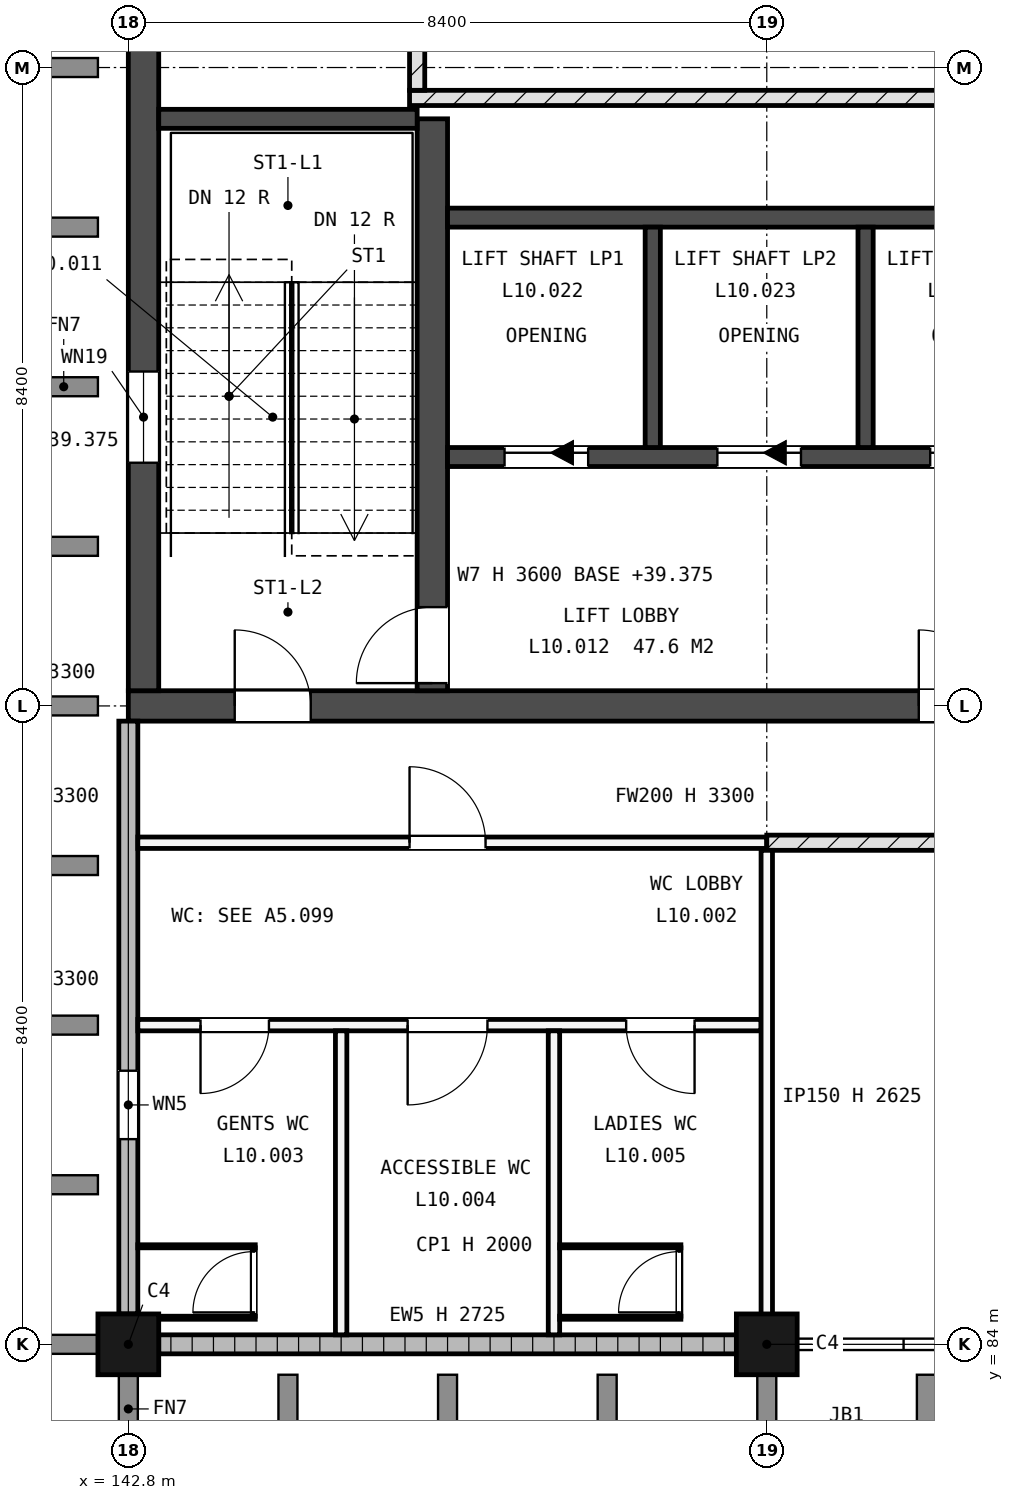
"""IFC4 building model, lengths in metres.
Left out: names, types, materials, properties, quantities, classifications, styles, units other than length and angle.
Written with IfcOpenShell. Run it as: python <this file> out.ifc"""

import sys

from ifc_helpers import new_model, si_unit, direction, frame, frame_2d, origin, origin_2d, place, context, subcontext, project, spatial, rectangle, extrude, element, fill, save


model = new_model("IFC4")
c1 = context("Model", 3, precision=1e-05, world=origin(), true_north=direction((0.0, 1.0)))
c2 = subcontext(c1, "Body", "Model", "MODEL_VIEW")
j1 = project(units=[si_unit("LENGTHUNIT", "METRE"), si_unit("PLANEANGLEUNIT", "RADIAN")], contexts=[c1])
p1 = place(None, origin())
s1 = spatial("IfcSite", under=j1, at=p1, CompositionType="ELEMENT")
p2 = place(p1, origin())
s2 = spatial("IfcBuilding", under=s1, at=p2, CompositionType="ELEMENT")
p3 = place(p2, frame((0.0, 0.0, 39.6)))
s3 = spatial("IfcBuildingStorey", under=s2, at=p3, CompositionType="ELEMENT", Elevation=39.6)
for number, where, z_axis, x_axis in (
    (1, (142.8, 84.0, -0.225), (0.0, 0.0, 1.0), (1.0, 0.0, 0.0)),
    (2, (151.2, 84.0, -0.225), (0.0, 0.0, 1.0), (1.0, 0.0, 0.0)),
):
    element("IfcColumn", number, at=place(p3, frame(where, z_axis=z_axis, x_axis=x_axis)), inside=s3, PredefinedType="COLUMN", context=c2, shape_type="SweptSolid", body=[
        extrude(rectangle(XDim=0.8, YDim=0.8, at=origin_2d()), origin(), (0.0, 0.0, 1.0), 3.6),
    ])
p4 = place(p3, frame((142.8, 92.4, -0.225), z_axis=(0.0, 0.0, 1.0), x_axis=(1.0, 0.0, 0.0)))
e3 = element("IfcWall", 3, at=p4, inside=s3, PredefinedType="SHEAR", context=c2, shape_type="SweptSolid", body=[
    extrude(rectangle(XDim=25.2, YDim=0.4, at=frame_2d((12.6, 0.0))), origin(), (0.0, 0.0, 1.0), 3.6),
])
p5 = place(p4, frame((1.4, 0.0, 0.225)))
e4 = element("IfcOpeningElement", 4, at=p5, cuts=e3, PredefinedType="OPENING", context=c2, shape_type="SweptSolid", body=[
    extrude(rectangle(XDim=1.0, YDim=2.1, at=frame_2d((0.5, 1.05))), frame((0.0, 0.21, 0.0), z_axis=(0.0, -1.0, 0.0), x_axis=(1.0, 0.0, 0.0)), (0.0, 0.0, 1.0), 0.42),
])
p6 = place(p4, frame((19.1, 0.0, 0.225)))
e5 = element("IfcOpeningElement", 5, at=p6, cuts=e3, PredefinedType="OPENING", context=c2, shape_type="SweptSolid", body=[
    extrude(rectangle(XDim=1.0, YDim=2.1, at=frame_2d((0.5, 1.05))), frame((0.0, 0.21, 0.0), z_axis=(0.0, -1.0, 0.0), x_axis=(1.0, 0.0, 0.0)), (0.0, 0.0, 1.0), 0.42),
])
p7 = place(p4, frame((10.4, 0.0, 0.225)))
e6 = element("IfcOpeningElement", 6, at=p7, cuts=e3, PredefinedType="OPENING", context=c2, shape_type="SweptSolid", body=[
    extrude(rectangle(XDim=1.0, YDim=2.1, at=frame_2d((0.5, 1.05))), frame((0.0, 0.21, 0.0), z_axis=(0.0, -1.0, 0.0), x_axis=(1.0, 0.0, 0.0)), (0.0, 0.0, 1.0), 0.42),
])
p8 = place(p3, frame((143.0, 92.6, -0.225), z_axis=(0.0, 0.0, 1.0), x_axis=(0.0, 1.0, 0.0)))
e7 = element("IfcWall", 7, at=p8, inside=s3, PredefinedType="SHEAR", context=c2, shape_type="SweptSolid", body=[
    extrude(rectangle(XDim=16.4, YDim=0.4, at=frame_2d((8.2, 0.0))), origin(), (0.0, 0.0, 1.0), 3.6),
])
p9 = place(p8, frame((3.0, 0.0, 1.825)))
e8 = element("IfcOpeningElement", 8, at=p9, cuts=e7, PredefinedType="OPENING", context=c2, shape_type="SweptSolid", body=[
    extrude(rectangle(XDim=1.2, YDim=0.9, at=frame_2d((0.6, 0.45))), frame((0.0, 0.21, 0.0), z_axis=(0.0, -1.0, 0.0), x_axis=(1.0, 0.0, 0.0)), (0.0, 0.0, 1.0), 0.42),
])
p10 = place(p3, frame((146.8, 92.6, -0.225), z_axis=(0.0, 0.0, 1.0), x_axis=(0.0, 1.0, 0.0)))
e9 = element("IfcWall", 9, at=p10, inside=s3, PredefinedType="SHEAR", context=c2, shape_type="SweptSolid", body=[
    extrude(rectangle(XDim=7.525, YDim=0.4, at=frame_2d((3.762, 0.0))), origin(), (0.0, 0.0, 1.0), 3.6),
])
p11 = place(p10, frame((0.1, 0.0, 0.225)))
e10 = element("IfcOpeningElement", 10, at=p11, cuts=e9, PredefinedType="OPENING", context=c2, shape_type="SweptSolid", body=[
    extrude(rectangle(XDim=1.0, YDim=2.1, at=frame_2d((0.5, 1.05))), frame((0.0, 0.21, 0.0), z_axis=(0.0, -1.0, 0.0), x_axis=(1.0, 0.0, 0.0)), (0.0, 0.0, 1.0), 0.42),
])
p12 = place(p3, frame((143.2, 100.125, -0.225), z_axis=(0.0, 0.0, 1.0), x_axis=(1.0, 0.0, 0.0)))
e11 = element("IfcWall", 11, at=p12, inside=s3, PredefinedType="SHEAR", context=c2, shape_type="SweptSolid", body=[
    extrude(rectangle(XDim=3.4, YDim=0.25, at=frame_2d((1.7, 0.0))), origin(), (0.0, 0.0, 1.0), 3.6),
])
p13 = place(p3, frame((147.0, 95.675, -0.225), z_axis=(0.0, 0.0, 1.0), x_axis=(1.0, 0.0, 0.0)))
e12 = element("IfcWall", 12, at=p13, inside=s3, PredefinedType="SHEAR", context=c2, shape_type="SweptSolid", body=[
    extrude(rectangle(XDim=11.25, YDim=0.25, at=frame_2d((5.625, 0.0))), origin(), (0.0, 0.0, 1.0), 3.6),
])
p14 = place(p13, frame((0.75, 0.0, 0.225)))
e13 = element("IfcOpeningElement", 13, at=p14, cuts=e12, PredefinedType="OPENING", context=c2, shape_type="SweptSolid", body=[
    extrude(rectangle(XDim=1.1, YDim=2.1, at=frame_2d((0.55, 1.05))), frame((0.0, 0.135, 0.0), z_axis=(0.0, -1.0, 0.0), x_axis=(1.0, 0.0, 0.0)), (0.0, 0.0, 1.0), 0.27),
])
p15 = place(p13, frame((3.55, 0.0, 0.225)))
e14 = element("IfcOpeningElement", 14, at=p15, cuts=e12, PredefinedType="OPENING", context=c2, shape_type="SweptSolid", body=[
    extrude(rectangle(XDim=1.1, YDim=2.1, at=frame_2d((0.55, 1.05))), frame((0.0, 0.135, 0.0), z_axis=(0.0, -1.0, 0.0), x_axis=(1.0, 0.0, 0.0)), (0.0, 0.0, 1.0), 0.27),
])
p16 = place(p13, frame((6.35, 0.0, 0.225)))
e15 = element("IfcOpeningElement", 15, at=p16, cuts=e12, PredefinedType="OPENING", context=c2, shape_type="SweptSolid", body=[
    extrude(rectangle(XDim=1.1, YDim=2.1, at=frame_2d((0.55, 1.05))), frame((0.0, 0.135, 0.0), z_axis=(0.0, -1.0, 0.0), x_axis=(1.0, 0.0, 0.0)), (0.0, 0.0, 1.0), 0.27),
])
p17 = place(p13, frame((9.15, 0.0, 0.225)))
e16 = element("IfcOpeningElement", 16, at=p17, cuts=e12, PredefinedType="OPENING", context=c2, shape_type="SweptSolid", body=[
    extrude(rectangle(XDim=1.1, YDim=2.1, at=frame_2d((0.55, 1.05))), frame((0.0, 0.135, 0.0), z_axis=(0.0, -1.0, 0.0), x_axis=(1.0, 0.0, 0.0)), (0.0, 0.0, 1.0), 0.27),
])
p18 = place(p3, frame((147.0, 98.825, -0.225), z_axis=(0.0, 0.0, 1.0), x_axis=(1.0, 0.0, 0.0)))
e17 = element("IfcWall", 17, at=p18, inside=s3, PredefinedType="SHEAR", context=c2, shape_type="SweptSolid", body=[
    extrude(rectangle(XDim=11.25, YDim=0.25, at=frame_2d((5.625, 0.0))), origin(), (0.0, 0.0, 1.0), 3.6),
])
for number, where, z_axis, x_axis in (
    (18, (149.7, 95.8, -0.225), (0.0, 0.0, 1.0), (0.0, 1.0, 0.0)),
    (19, (152.5, 95.8, -0.225), (0.0, 0.0, 1.0), (0.0, 1.0, 0.0)),
):
    element("IfcWall", number, at=place(p3, frame(where, z_axis=z_axis, x_axis=x_axis)), inside=s3, PredefinedType="SHEAR", context=c2, shape_type="SweptSolid", body=[
        extrude(rectangle(XDim=2.9, YDim=0.2, at=frame_2d((1.45, 0.0))), origin(), (0.0, 0.0, 1.0), 3.6),
    ])
p19 = place(p3, frame((143.2, 84.0, 0.0), z_axis=(0.0, 0.0, 1.0), x_axis=(1.0, 0.0, 0.0)))
e20 = element("IfcWall", 20, at=p19, inside=s3, PredefinedType="STANDARD", context=c2, shape_type="SweptSolid", body=[
    extrude(rectangle(XDim=7.6, YDim=0.25, at=frame_2d((3.8, 0.0))), origin(), (0.0, 0.0, 1.0), 2.725),
])
p20 = place(p3, frame((142.8, 84.4, 0.0), z_axis=(0.0, 0.0, 1.0), x_axis=(0.0, 1.0, 0.0)))
e21 = element("IfcWall", 21, at=p20, inside=s3, PredefinedType="STANDARD", context=c2, shape_type="SweptSolid", body=[
    extrude(rectangle(XDim=7.8, YDim=0.25, at=frame_2d((3.9, 0.0))), origin(), (0.0, 0.0, 1.0), 3.3),
])
p21 = place(p20, frame((2.3, 0.0, 2.1)))
e22 = element("IfcOpeningElement", 22, at=p21, cuts=e21, PredefinedType="OPENING", context=c2, shape_type="SweptSolid", body=[
    extrude(rectangle(XDim=0.9, YDim=0.6, at=frame_2d((0.45, 0.3))), frame((0.0, 0.135, 0.0), z_axis=(0.0, -1.0, 0.0), x_axis=(1.0, 0.0, 0.0)), (0.0, 0.0, 1.0), 0.27),
])
p22 = place(p3, frame((142.925, 88.2, 0.0), z_axis=(0.0, 0.0, 1.0), x_axis=(1.0, 0.0, 0.0)))
e23 = element("IfcWall", 23, at=p22, inside=s3, PredefinedType="PARTITIONING", context=c2, shape_type="SweptSolid", body=[
    extrude(rectangle(XDim=8.2, YDim=0.15, at=frame_2d((4.1, 0.0))), origin(), (0.0, 0.0, 1.0), 3.3),
])
p23 = place(p22, frame((0.825, 0.0, 0.0)))
e24 = element("IfcOpeningElement", 24, at=p23, cuts=e23, PredefinedType="OPENING", context=c2, shape_type="SweptSolid", body=[
    extrude(rectangle(XDim=0.9, YDim=2.1, at=frame_2d((0.45, 1.05))), frame((0.0, 0.085, 0.0), z_axis=(0.0, -1.0, 0.0), x_axis=(1.0, 0.0, 0.0)), (0.0, 0.0, 1.0), 0.17),
])
p24 = place(p22, frame((3.55, 0.0, 0.0)))
e25 = element("IfcOpeningElement", 25, at=p24, cuts=e23, PredefinedType="OPENING", context=c2, shape_type="SweptSolid", body=[
    extrude(rectangle(XDim=1.05, YDim=2.25, at=frame_2d((0.525, 1.125))), frame((0.0, 0.085, 0.0), z_axis=(0.0, -1.0, 0.0), x_axis=(1.0, 0.0, 0.0)), (0.0, 0.0, 1.0), 0.17),
])
p25 = place(p22, frame((6.425, 0.0, 0.0)))
e26 = element("IfcOpeningElement", 26, at=p25, cuts=e23, PredefinedType="OPENING", context=c2, shape_type="SweptSolid", body=[
    extrude(rectangle(XDim=0.9, YDim=2.1, at=frame_2d((0.45, 1.05))), frame((0.0, 0.085, 0.0), z_axis=(0.0, -1.0, 0.0), x_axis=(1.0, 0.0, 0.0)), (0.0, 0.0, 1.0), 0.17),
])
p26 = place(p3, frame((142.925, 90.6, 0.0), z_axis=(0.0, 0.0, 1.0), x_axis=(1.0, 0.0, 0.0)))
e27 = element("IfcWall", 27, at=p26, inside=s3, PredefinedType="PARTITIONING", context=c2, shape_type="SweptSolid", body=[
    extrude(rectangle(XDim=8.275, YDim=0.15, at=frame_2d((4.137, 0.0))), origin(), (0.0, 0.0, 1.0), 3.3),
])
p27 = place(p26, frame((3.575, 0.0, 0.0)))
e28 = element("IfcOpeningElement", 28, at=p27, cuts=e27, PredefinedType="OPENING", context=c2, shape_type="SweptSolid", body=[
    extrude(rectangle(XDim=1.0, YDim=2.1, at=frame_2d((0.5, 1.05))), frame((0.0, 0.085, 0.0), z_axis=(0.0, -1.0, 0.0), x_axis=(1.0, 0.0, 0.0)), (0.0, 0.0, 1.0), 0.17),
])
p28 = place(p3, frame((151.2, 90.6, 0.0), z_axis=(0.0, 0.0, 1.0), x_axis=(1.0, 0.0, 0.0)))
e29 = element("IfcWall", 29, at=p28, inside=s3, PredefinedType="SOLIDWALL", context=c2, shape_type="SweptSolid", body=[
    extrude(rectangle(XDim=16.8, YDim=0.2, at=frame_2d((8.4, 0.0))), origin(), (0.0, 0.0, 1.0), 3.3),
])
p29 = place(p28, frame((5.8, 0.0, 0.0)))
e30 = element("IfcOpeningElement", 30, at=p29, cuts=e29, PredefinedType="OPENING", context=c2, shape_type="SweptSolid", body=[
    extrude(rectangle(XDim=1.0, YDim=2.1, at=frame_2d((0.5, 1.05))), frame((0.0, 0.11, 0.0), z_axis=(0.0, -1.0, 0.0), x_axis=(1.0, 0.0, 0.0)), (0.0, 0.0, 1.0), 0.22),
])
p30 = place(p28, frame((14.2, 0.0, 0.0)))
e31 = element("IfcOpeningElement", 31, at=p30, cuts=e29, PredefinedType="OPENING", context=c2, shape_type="SweptSolid", body=[
    extrude(rectangle(XDim=1.0, YDim=2.1, at=frame_2d((0.5, 1.05))), frame((0.0, 0.11, 0.0), z_axis=(0.0, -1.0, 0.0), x_axis=(1.0, 0.0, 0.0)), (0.0, 0.0, 1.0), 0.22),
])
p31 = place(p3, frame((146.5, 100.4, 0.0), z_axis=(0.0, 0.0, 1.0), x_axis=(1.0, 0.0, 0.0)))
e32 = element("IfcWall", 32, at=p31, inside=s3, PredefinedType="SOLIDWALL", context=c2, shape_type="SweptSolid", body=[
    extrude(rectangle(XDim=14.0, YDim=0.2, at=frame_2d((7.0, 0.0))), origin(), (0.0, 0.0, 1.0), 3.3),
])
p32 = place(p3, frame((145.6, 84.125, 0.0), z_axis=(0.0, 0.0, 1.0), x_axis=(0.0, 1.0, 0.0)))
e33 = element("IfcWall", 33, at=p32, inside=s3, PredefinedType="PARTITIONING", context=c2, shape_type="SweptSolid", body=[
    extrude(rectangle(XDim=4.0, YDim=0.15, at=frame_2d((2.0, 0.0))), origin(), (0.0, 0.0, 1.0), 3.3),
])
p33 = place(p3, frame((146.6, 100.5, 0.0), z_axis=(0.0, 0.0, 1.0), x_axis=(0.0, 1.0, 0.0)))
e34 = element("IfcWall", 34, at=p33, inside=s3, PredefinedType="SOLIDWALL", context=c2, shape_type="SweptSolid", body=[
    extrude(rectangle(XDim=5.3, YDim=0.2, at=frame_2d((2.65, 0.0))), origin(), (0.0, 0.0, 1.0), 3.3),
])
p34 = place(p33, frame((1.8, 0.0, 0.0)))
e35 = element("IfcOpeningElement", 35, at=p34, cuts=e34, PredefinedType="OPENING", context=c2, shape_type="SweptSolid", body=[
    extrude(rectangle(XDim=1.0, YDim=2.1, at=frame_2d((0.5, 1.05))), frame((0.0, 0.11, 0.0), z_axis=(0.0, -1.0, 0.0), x_axis=(1.0, 0.0, 0.0)), (0.0, 0.0, 1.0), 0.22),
])
p35 = place(p3, frame((148.4, 84.125, 0.0), z_axis=(0.0, 0.0, 1.0), x_axis=(0.0, 1.0, 0.0)))
e36 = element("IfcWall", 36, at=p35, inside=s3, PredefinedType="PARTITIONING", context=c2, shape_type="SweptSolid", body=[
    extrude(rectangle(XDim=4.0, YDim=0.15, at=frame_2d((2.0, 0.0))), origin(), (0.0, 0.0, 1.0), 3.3),
])
p36 = place(p3, frame((151.2, 84.0, 0.0), z_axis=(0.0, 0.0, 1.0), x_axis=(0.0, 1.0, 0.0)))
e37 = element("IfcWall", 37, at=p36, inside=s3, PredefinedType="PARTITIONING", context=c2, shape_type="SweptSolid", body=[
    extrude(rectangle(XDim=6.5, YDim=0.15, at=frame_2d((3.25, 0.0))), origin(), (0.0, 0.0, 1.0), 2.625),
])
p37 = place(p3, frame((142.93, 84.35, 0.0), z_axis=(0.0, 0.0, 1.0), x_axis=(1.0, 0.0, 0.0)))
e38 = element("IfcWall", 38, at=p37, inside=s3, PredefinedType="PARTITIONING", context=c2, shape_type="SweptSolid", body=[
    extrude(rectangle(XDim=1.54, YDim=0.04, at=frame_2d((0.77, 0.0))), origin(), (0.0, 0.0, 1.0), 2.0),
])
p38 = place(p3, frame((142.925, 85.29, 0.0), z_axis=(0.0, 0.0, 1.0), x_axis=(1.0, 0.0, 0.0)))
e39 = element("IfcWall", 39, at=p38, inside=s3, PredefinedType="PARTITIONING", context=c2, shape_type="SweptSolid", body=[
    extrude(rectangle(XDim=1.545, YDim=0.04, at=frame_2d((0.772, 0.0))), origin(), (0.0, 0.0, 1.0), 2.0),
])
p39 = place(p3, frame((144.45, 84.37, 0.0), z_axis=(0.0, 0.0, 1.0), x_axis=(0.0, 1.0, 0.0)))
e40 = element("IfcWall", 40, at=p39, inside=s3, PredefinedType="PARTITIONING", context=c2, shape_type="SweptSolid", body=[
    extrude(rectangle(XDim=0.9, YDim=0.04, at=frame_2d((0.45, 0.0))), origin(), (0.0, 0.0, 1.0), 2.0),
])
p40 = place(p39, frame((0.05, 0.0, 0.0)))
e41 = element("IfcOpeningElement", 41, at=p40, cuts=e40, PredefinedType="OPENING", context=c2, shape_type="SweptSolid", body=[
    extrude(rectangle(XDim=0.8, YDim=2.0, at=frame_2d((0.4, 1.0))), frame((0.0, 0.03, 0.0), z_axis=(0.0, -1.0, 0.0), x_axis=(1.0, 0.0, 0.0)), (0.0, 0.0, 1.0), 0.06),
])
for number, where, z_axis, x_axis in (
    (42, (148.475, 84.35, 0.0), (0.0, 0.0, 1.0), (1.0, 0.0, 0.0)),
    (43, (148.475, 85.29, 0.0), (0.0, 0.0, 1.0), (1.0, 0.0, 0.0)),
):
    element("IfcWall", number, at=place(p3, frame(where, z_axis=z_axis, x_axis=x_axis)), inside=s3, PredefinedType="PARTITIONING", context=c2, shape_type="SweptSolid", body=[
        extrude(rectangle(XDim=1.595, YDim=0.04, at=frame_2d((0.797, 0.0))), origin(), (0.0, 0.0, 1.0), 2.0),
    ])
p41 = place(p3, frame((150.05, 84.37, 0.0), z_axis=(0.0, 0.0, 1.0), x_axis=(0.0, 1.0, 0.0)))
e44 = element("IfcWall", 44, at=p41, inside=s3, PredefinedType="PARTITIONING", context=c2, shape_type="SweptSolid", body=[
    extrude(rectangle(XDim=0.9, YDim=0.04, at=frame_2d((0.45, 0.0))), origin(), (0.0, 0.0, 1.0), 2.0),
])
p42 = place(p41, frame((0.05, 0.0, 0.0)))
e45 = element("IfcOpeningElement", 45, at=p42, cuts=e44, PredefinedType="OPENING", context=c2, shape_type="SweptSolid", body=[
    extrude(rectangle(XDim=0.8, YDim=2.0, at=frame_2d((0.4, 1.0))), frame((0.0, 0.03, 0.0), z_axis=(0.0, -1.0, 0.0), x_axis=(1.0, 0.0, 0.0)), (0.0, 0.0, 1.0), 0.06),
])
p43 = place(p21, origin())
e46 = element("IfcWindow", 46, at=p43, inside=s3, PartitioningType="SINGLE_PANEL", PredefinedType="WINDOW", context=c2, shape_type="SweptSolid", body=[
    extrude(rectangle(XDim=0.9, YDim=0.6, at=frame_2d((0.45, 0.3))), frame((0.0, 0.03, 0.0), z_axis=(0.0, -1.0, 0.0), x_axis=(1.0, 0.0, 0.0)), (0.0, 0.0, 1.0), 0.06),
])
fill(e22, e46)
p44 = place(p9, origin())
e47 = element("IfcWindow", 47, at=p44, inside=s3, PartitioningType="SINGLE_PANEL", PredefinedType="WINDOW", context=c2, shape_type="SweptSolid", body=[
    extrude(rectangle(XDim=1.2, YDim=0.9, at=frame_2d((0.6, 0.45))), frame((0.0, 0.03, 0.0), z_axis=(0.0, -1.0, 0.0), x_axis=(1.0, 0.0, 0.0)), (0.0, 0.0, 1.0), 0.06),
])
fill(e8, e47)
p45 = place(p14, origin())
e48 = element("IfcDoor", 48, at=p45, inside=s3, OperationType="SLIDING_TO_LEFT", PredefinedType="DOOR", context=c2, shape_type="SweptSolid", body=[
    extrude(rectangle(XDim=1.1, YDim=2.1, at=frame_2d((0.55, 1.05))), frame((0.0, 0.025, 0.0), z_axis=(0.0, -1.0, 0.0), x_axis=(1.0, 0.0, 0.0)), (0.0, 0.0, 1.0), 0.05),
])
fill(e13, e48)
p46 = place(p15, origin())
e49 = element("IfcDoor", 49, at=p46, inside=s3, OperationType="SLIDING_TO_LEFT", PredefinedType="DOOR", context=c2, shape_type="SweptSolid", body=[
    extrude(rectangle(XDim=1.1, YDim=2.1, at=frame_2d((0.55, 1.05))), frame((0.0, 0.025, 0.0), z_axis=(0.0, -1.0, 0.0), x_axis=(1.0, 0.0, 0.0)), (0.0, 0.0, 1.0), 0.05),
])
fill(e14, e49)
p47 = place(p16, origin())
e50 = element("IfcDoor", 50, at=p47, inside=s3, OperationType="SLIDING_TO_LEFT", PredefinedType="DOOR", context=c2, shape_type="SweptSolid", body=[
    extrude(rectangle(XDim=1.1, YDim=2.1, at=frame_2d((0.55, 1.05))), frame((0.0, 0.025, 0.0), z_axis=(0.0, -1.0, 0.0), x_axis=(1.0, 0.0, 0.0)), (0.0, 0.0, 1.0), 0.05),
])
fill(e15, e50)
p48 = place(p5, origin())
e51 = element("IfcDoor", 51, at=p48, inside=s3, OperationType="SINGLE_SWING_RIGHT", PredefinedType="DOOR", context=c2, shape_type="SweptSolid", body=[
    extrude(rectangle(XDim=1.0, YDim=2.1, at=frame_2d((0.5, 1.05))), frame((0.0, 0.025, 0.0), z_axis=(0.0, -1.0, 0.0), x_axis=(1.0, 0.0, 0.0)), (0.0, 0.0, 1.0), 0.05),
])
fill(e4, e51)
p49 = place(p11, origin())
e52 = element("IfcDoor", 52, at=p49, inside=s3, OperationType="SINGLE_SWING_RIGHT", PredefinedType="DOOR", context=c2, shape_type="SweptSolid", body=[
    extrude(rectangle(XDim=1.0, YDim=2.1, at=frame_2d((0.5, 1.05))), frame((0.0, 0.025, 0.0), z_axis=(0.0, -1.0, 0.0), x_axis=(1.0, 0.0, 0.0)), (0.0, 0.0, 1.0), 0.05),
])
fill(e10, e52)
p50 = place(p23, origin())
e53 = element("IfcDoor", 53, at=p50, inside=s3, OperationType="SINGLE_SWING_LEFT", PredefinedType="DOOR", context=c2, shape_type="SweptSolid", body=[
    extrude(rectangle(XDim=0.9, YDim=2.1, at=frame_2d((0.45, 1.05))), frame((0.0, 0.025, 0.0), z_axis=(0.0, -1.0, 0.0), x_axis=(1.0, 0.0, 0.0)), (0.0, 0.0, 1.0), 0.05),
])
fill(e24, e53)
p51 = place(p24, origin())
e54 = element("IfcDoor", 54, at=p51, inside=s3, OperationType="SINGLE_SWING_LEFT", PredefinedType="DOOR", context=c2, shape_type="SweptSolid", body=[
    extrude(rectangle(XDim=1.05, YDim=2.25, at=frame_2d((0.525, 1.125))), frame((0.0, 0.025, 0.0), z_axis=(0.0, -1.0, 0.0), x_axis=(1.0, 0.0, 0.0)), (0.0, 0.0, 1.0), 0.05),
])
fill(e25, e54)
p52 = place(p25, origin())
e55 = element("IfcDoor", 55, at=p52, inside=s3, OperationType="SINGLE_SWING_RIGHT", PredefinedType="DOOR", context=c2, shape_type="SweptSolid", body=[
    extrude(rectangle(XDim=0.9, YDim=2.1, at=frame_2d((0.45, 1.05))), frame((0.0, 0.025, 0.0), z_axis=(0.0, -1.0, 0.0), x_axis=(1.0, 0.0, 0.0)), (0.0, 0.0, 1.0), 0.05),
])
fill(e26, e55)
p53 = place(p27, origin())
e56 = element("IfcDoor", 56, at=p53, inside=s3, OperationType="SINGLE_SWING_RIGHT", PredefinedType="DOOR", context=c2, shape_type="SweptSolid", body=[
    extrude(rectangle(XDim=1.0, YDim=2.1, at=frame_2d((0.5, 1.05))), frame((0.0, 0.025, 0.0), z_axis=(0.0, -1.0, 0.0), x_axis=(1.0, 0.0, 0.0)), (0.0, 0.0, 1.0), 0.05),
])
fill(e28, e56)
p54 = place(p7, origin())
e57 = element("IfcDoor", 57, at=p54, inside=s3, OperationType="SINGLE_SWING_RIGHT", PredefinedType="DOOR", context=c2, shape_type="SweptSolid", body=[
    extrude(rectangle(XDim=1.0, YDim=2.1, at=frame_2d((0.5, 1.05))), frame((0.0, 0.025, 0.0), z_axis=(0.0, -1.0, 0.0), x_axis=(1.0, 0.0, 0.0)), (0.0, 0.0, 1.0), 0.05),
])
fill(e6, e57)
p55 = place(p40, origin())
e58 = element("IfcDoor", 58, at=p55, inside=s3, OperationType="SINGLE_SWING_LEFT", PredefinedType="DOOR", context=c2, shape_type="SweptSolid", body=[
    extrude(rectangle(XDim=0.8, YDim=2.0, at=frame_2d((0.4, 1.0))), frame((0.0, 0.02, 0.0), z_axis=(0.0, -1.0, 0.0), x_axis=(1.0, 0.0, 0.0)), (0.0, 0.0, 1.0), 0.04),
])
fill(e41, e58)
p56 = place(p42, origin())
e59 = element("IfcDoor", 59, at=p56, inside=s3, OperationType="SINGLE_SWING_LEFT", PredefinedType="DOOR", context=c2, shape_type="SweptSolid", body=[
    extrude(rectangle(XDim=0.8, YDim=2.0, at=frame_2d((0.4, 1.0))), frame((0.0, 0.02, 0.0), z_axis=(0.0, -1.0, 0.0), x_axis=(1.0, 0.0, 0.0)), (0.0, 0.0, 1.0), 0.04),
])
fill(e45, e59)
save(model, sys.argv[1])
